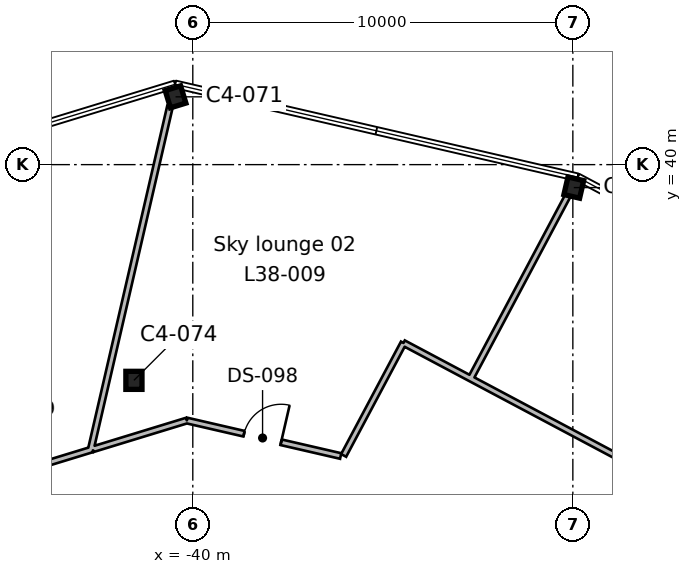
"""IFC4 building model, lengths in metres.
Left out: names, types, materials, properties, quantities, classifications, styles, units other than length and angle.
Written with IfcOpenShell. Run it as: python <this file> out.ifc"""

import sys

from ifc_helpers import new_model, si_unit, direction, frame, frame_2d, origin, origin_2d, place, context, subcontext, project, spatial, rectangle, i_section, extrude, element, fill, save


model = new_model("IFC4")
c1 = context("Model", 3, precision=1e-05, world=origin(), true_north=direction((0.0, 1.0)))
c2 = subcontext(c1, "Body", "Model", "MODEL_VIEW")
j1 = project(units=[si_unit("LENGTHUNIT", "METRE"), si_unit("PLANEANGLEUNIT", "RADIAN")], contexts=[c1])
p1 = place(None, origin())
s1 = spatial("IfcSite", under=j1, at=p1, CompositionType="ELEMENT")
p2 = place(p1, origin())
s2 = spatial("IfcBuilding", under=s1, at=p2, CompositionType="ELEMENT")
p3 = place(p2, frame((0.0, 0.0, 178.2)))
s3 = spatial("IfcBuildingStorey", under=s2, at=p3, CompositionType="ELEMENT", Elevation=178.2)
for number, where, z_axis, x_axis in (
    (1, (-41.549, 34.324, 0.0), (0.0, 0.0, 1.0), (1.0, 0.0, 0.0)),
    (2, (-29.975, 39.396, 0.0), (0.0, 0.0, 1.0), (-0.974, 0.225, 0.0)),
    (3, (-40.454, 41.784, 0.0), (0.0, 0.0, 1.0), (-0.956, -0.292, 0.0)),
):
    element("IfcColumn", number, at=place(p3, frame(where, z_axis=z_axis, x_axis=x_axis)), inside=s3, PredefinedType="COLUMN", context=c2, shape_type="SweptSolid", body=[
        extrude(i_section(OverallWidth=0.424, OverallDepth=0.475, WebThickness=0.048, FlangeThickness=0.077, FilletRadius=0.015, at=origin_2d()), origin(), (0.0, 0.0, 1.0), 5.4),
    ])
p4 = place(p3, frame((-42.639, 32.509, 0.0), z_axis=(0.0, 0.0, 1.0), x_axis=(-0.956263759499, -0.292505764504, 0.0)))
e4 = element("IfcWall", 4, at=p4, inside=s3, PredefinedType="PARTITIONING", context=c2, shape_type="SweptSolid", body=[
    extrude(rectangle(XDim=3.692, YDim=0.15, at=frame_2d((1.846, 0.0))), origin(), (0.0, 0.0, 1.0), 4.95),
])
p5 = place(p4, frame((1.475, 0.0, 0.0)))
e5 = element("IfcOpeningElement", 5, at=p5, cuts=e4, PredefinedType="OPENING", context=c2, shape_type="SweptSolid", body=[
    extrude(rectangle(XDim=1.0, YDim=2.1, at=frame_2d((0.5, 1.05))), frame((0.0, 0.085, 0.0), z_axis=(0.0, -1.0, 0.0), x_axis=(1.0, 0.0, 0.0)), (0.0, 0.0, 1.0), 0.17),
])
p6 = place(p3, frame((-40.599, 41.534, 0.0), z_axis=(0.0, 0.0, 1.0), x_axis=(-0.224936379831, -0.974373452547, 0.0)))
e6 = element("IfcWall", 6, at=p6, inside=s3, PredefinedType="PARTITIONING", context=c2, shape_type="SweptSolid", body=[
    extrude(rectangle(XDim=9.278, YDim=0.15, at=frame_2d((4.639, 0.0))), origin(), (0.0, 0.0, 1.0), 4.95),
])
p7 = place(p3, frame((-36.109, 32.333, 0.0), z_axis=(0.0, 0.0, 1.0), x_axis=(-0.974409020702, 0.224782251021, 0.0)))
e7 = element("IfcWall", 7, at=p7, inside=s3, PredefinedType="PARTITIONING", context=c2, shape_type="SweptSolid", body=[
    extrude(rectangle(XDim=4.154, YDim=0.15, at=frame_2d((2.077, 0.0))), origin(), (0.0, 0.0, 1.0), 4.95),
])
p8 = place(p7, frame((1.609, 0.0, 0.0)))
e8 = element("IfcOpeningElement", 8, at=p8, cuts=e7, PredefinedType="OPENING", context=c2, shape_type="SweptSolid", body=[
    extrude(rectangle(XDim=1.0, YDim=2.1, at=frame_2d((0.5, 1.05))), frame((0.0, 0.085, 0.0), z_axis=(0.0, -1.0, 0.0), x_axis=(1.0, 0.0, 0.0)), (0.0, 0.0, 1.0), 0.17),
])
p9 = place(p3, frame((-40.157, 33.267, 0.0), z_axis=(0.0, 0.0, 1.0), x_axis=(-0.956265748616, -0.292499261577, 0.0)))
e9 = element("IfcWall", 9, at=p9, inside=s3, PredefinedType="PARTITIONING", context=c2, shape_type="SweptSolid", body=[
    extrude(rectangle(XDim=2.585, YDim=0.15, at=frame_2d((1.292, 0.0))), origin(), (0.0, 0.0, 1.0), 4.95),
])
p10 = place(p3, frame((-32.694, 34.372, 0.0), z_axis=(0.0, 0.0, 1.0), x_axis=(-0.883022288262, 0.469331054196, 0.0)))
e10 = element("IfcWall", 10, at=p10, inside=s3, PredefinedType="PARTITIONING", context=c2, shape_type="SweptSolid", body=[
    extrude(rectangle(XDim=1.997, YDim=0.15, at=frame_2d((0.998, 0.0))), origin(), (0.0, 0.0, 1.0), 4.95),
])
p11 = place(p3, frame((-36.031, 32.349, 0.0), z_axis=(0.0, 0.0, 1.0), x_axis=(0.469730105037, 0.882810074944, 0.0)))
e11 = element("IfcWall", 11, at=p11, inside=s3, PredefinedType="PARTITIONING", context=c2, shape_type="SweptSolid", body=[
    extrude(rectangle(XDim=3.353, YDim=0.15, at=frame_2d((1.676, 0.0))), origin(), (0.0, 0.0, 1.0), 4.95),
])
p12 = place(p3, frame((-32.694, 34.372, 0.0), z_axis=(0.0, 0.0, 1.0), x_axis=(0.882941399111, -0.469483211346, 0.0)))
e12 = element("IfcWall", 12, at=p12, inside=s3, PredefinedType="PARTITIONING", context=c2, shape_type="SweptSolid", body=[
    extrude(rectangle(XDim=18.067, YDim=0.15, at=frame_2d((9.034, 0.0))), origin(), (0.0, 0.0, 1.0), 4.95),
])
p13 = place(p12, frame((8.55, 0.0, 0.0)))
e13 = element("IfcOpeningElement", 13, at=p13, cuts=e12, PredefinedType="OPENING", context=c2, shape_type="SweptSolid", body=[
    extrude(rectangle(XDim=1.0, YDim=2.1, at=frame_2d((0.5, 1.05))), frame((0.0, 0.085, 0.0), z_axis=(0.0, -1.0, 0.0), x_axis=(1.0, 0.0, 0.0)), (0.0, 0.0, 1.0), 0.17),
])
p14 = place(p3, frame((-30.129, 39.188, 0.0), z_axis=(0.0, 0.0, 1.0), x_axis=(-0.469375494652, -0.882998666488, 0.0)))
e14 = element("IfcWall", 14, at=p14, inside=s3, PredefinedType="PARTITIONING", context=c2, shape_type="SweptSolid", body=[
    extrude(rectangle(XDim=5.456, YDim=0.15, at=frame_2d((2.728, 0.0))), origin(), (0.0, 0.0, 1.0), 4.95),
])
p15 = place(p8, frame((1.0, 0.0, 0.0), z_axis=(0.0, 0.0, 1.0), x_axis=(-1.0, 0.0, 0.0)))
e15 = element("IfcDoor", 15, at=p15, inside=s3, OperationType="SINGLE_SWING_RIGHT", PredefinedType="DOOR", context=c2, shape_type="SweptSolid", body=[
    extrude(rectangle(XDim=1.0, YDim=2.1, at=frame_2d((0.5, 1.05))), frame((0.0, 0.025, 0.0), z_axis=(0.0, -1.0, 0.0), x_axis=(1.0, 0.0, 0.0)), (0.0, 0.0, 1.0), 0.05),
])
fill(e8, e15)
save(model, sys.argv[1])
